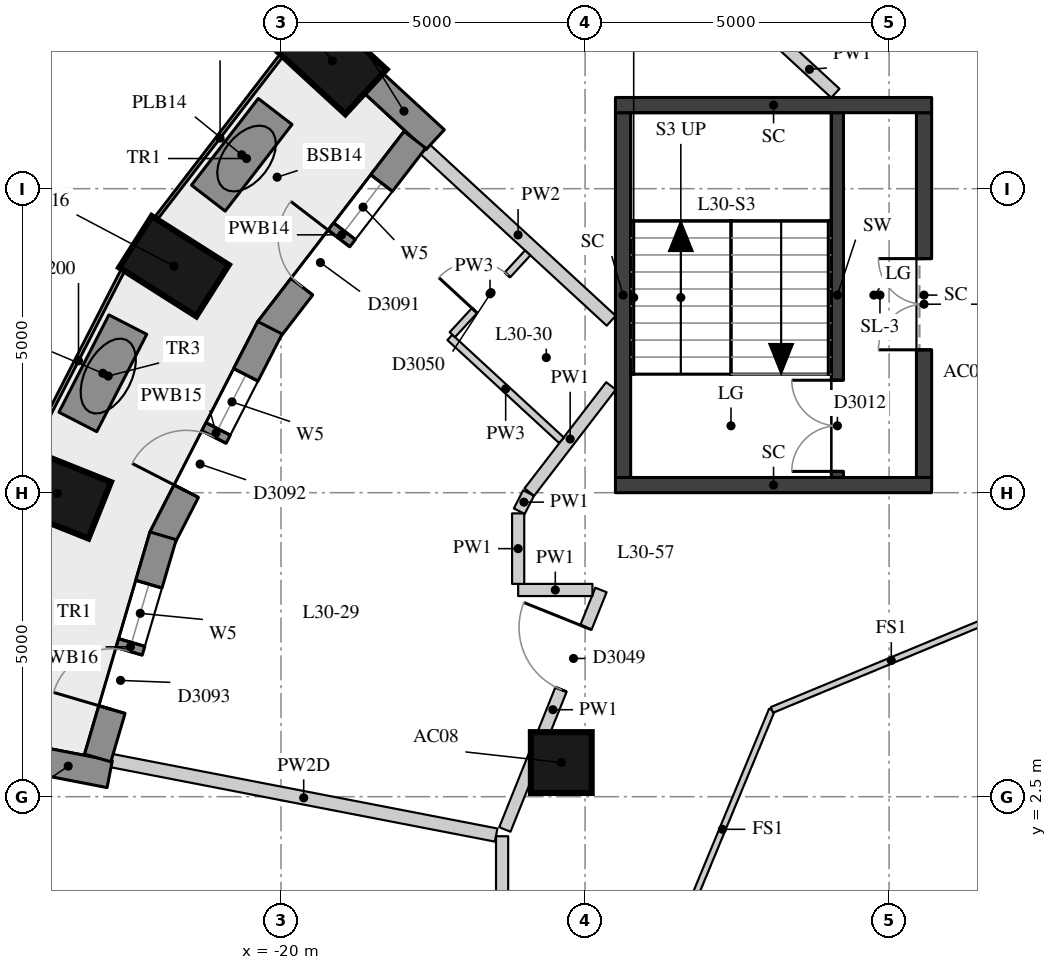
"""IFC4 building model, lengths in metres.
Left out: names, types, materials, properties, quantities, classifications, styles, units other than length and angle.
Written with IfcOpenShell. Run it as: python <this file> out.ifc"""

import sys

from ifc_helpers import new_model, si_unit, direction, frame, frame_2d, origin, origin_2d, place, context, subcontext, project, spatial, rectangle, extrude, element, fill, save


model = new_model("IFC4")
c1 = context("Model", 3, precision=1e-05, world=origin(), true_north=direction((0.0, 1.0)))
c2 = subcontext(c1, "Body", "Model", "MODEL_VIEW")
j1 = project(units=[si_unit("LENGTHUNIT", "METRE"), si_unit("PLANEANGLEUNIT", "RADIAN")], contexts=[c1])
p1 = place(None, origin())
s1 = spatial("IfcSite", under=j1, at=p1, CompositionType="ELEMENT")
p2 = place(p1, origin())
s2 = spatial("IfcBuilding", under=s1, at=p2, CompositionType="ELEMENT")
p3 = place(p2, frame((0.0, 0.0, 108.7)))
s3 = spatial("IfcBuildingStorey", under=s2, at=p3, CompositionType="ELEMENT", Elevation=108.7)
for number, where, z_axis, x_axis in (
    (1, (-19.156, 14.602, 0.0), (0.0, 0.0, 1.0), (-0.735, 0.678, 0.0)),
    (2, (-21.76, 11.225, 0.0), (0.0, 0.0, 1.0), (-0.845, 0.536, 0.0)),
    (3, (-23.679, 7.489, 0.0), (0.0, 0.0, 1.0), (-0.929, 0.371, 0.0)),
):
    element("IfcColumn", number, at=place(p3, frame(where, z_axis=z_axis, x_axis=x_axis)), inside=s3, PredefinedType="COLUMN", context=c2, shape_type="SweptSolid", body=[
        extrude(rectangle(XDim=1.5, YDim=1.0, at=origin_2d()), origin(), (0.0, 0.0, 1.0), 3.3),
    ])
p4 = place(p3, frame((-15.391, 3.062, 0.0), z_axis=(0.0, 0.0, 1.0), x_axis=(1.0, 0.0, 0.0)))
e4 = element("IfcColumn", 4, at=p4, inside=s3, PredefinedType="COLUMN", context=c2, shape_type="SweptSolid", body=[
    extrude(rectangle(XDim=1.0, YDim=1.0, at=origin_2d()), origin(), (0.0, 0.0, 1.0), 3.3),
])
p5 = place(p3, frame((-18.49, 14.247, 0.0), z_axis=(0.0, 0.0, 1.0), x_axis=(0.735307968822, -0.67773312667, 0.0)))
e5 = element("IfcWall", 5, at=p5, inside=s3, PredefinedType="SOLIDWALL", context=c2, shape_type="SweptSolid", body=[
    extrude(rectangle(XDim=1.391, YDim=0.45, at=frame_2d((0.695, 0.0))), origin(), (0.0, 0.0, 1.0), 3.02),
])
p6 = place(p3, frame((-24.183, 3.135, 0.0), z_axis=(0.0, 0.0, 1.0), x_axis=(0.981744955624, -0.190202108576, 0.0)))
e6 = element("IfcWall", 6, at=p6, inside=s3, PredefinedType="SOLIDWALL", context=c2, shape_type="SweptSolid", body=[
    extrude(rectangle(XDim=1.39, YDim=0.45, at=frame_2d((0.695, 0.0))), origin(), (0.0, 0.0, 1.0), 2.47),
])
p7 = place(p3, frame((-17.799, 13.304, 0.0), z_axis=(0.0, 0.0, 1.0), x_axis=(-0.609698797728, -0.792633191362, 0.0)))
e7 = element("IfcWall", 7, at=p7, inside=s3, PredefinedType="SOLIDWALL", context=c2, shape_type="SweptSolid", body=[
    extrude(rectangle(XDim=3.945, YDim=0.45, at=frame_2d((1.973, 0.0))), origin(), (0.0, 0.0, 1.0), 3.02),
])
p8 = place(p7, frame((0.897, 0.0, 0.4)))
e8 = element("IfcOpeningElement", 8, at=p8, cuts=e7, PredefinedType="OPENING", context=c2, shape_type="SweptSolid", body=[
    extrude(rectangle(XDim=1.0, YDim=1.75, at=frame_2d((0.5, 0.875))), frame((0.0, 0.235, 0.0), z_axis=(0.0, -1.0, 0.0), x_axis=(1.0, 0.0, 0.0)), (0.0, 0.0, 1.0), 0.47),
])
p9 = place(p7, frame((2.047, 0.0, 0.0)))
e9 = element("IfcOpeningElement", 9, at=p9, cuts=e7, PredefinedType="OPENING", context=c2, shape_type="SweptSolid", body=[
    extrude(rectangle(XDim=1.0, YDim=2.15, at=frame_2d((0.5, 1.075))), frame((0.0, 0.235, 0.0), z_axis=(0.0, -1.0, 0.0), x_axis=(1.0, 0.0, 0.0)), (0.0, 0.0, 1.0), 0.47),
])
p10 = place(p3, frame((-20.182, 10.212, 0.0), z_axis=(0.0, 0.0, 1.0), x_axis=(-0.455932890657, -0.890014156751, 0.0)))
e10 = element("IfcWall", 10, at=p10, inside=s3, PredefinedType="SOLIDWALL", context=c2, shape_type="SweptSolid", body=[
    extrude(rectangle(XDim=3.888, YDim=0.45, at=frame_2d((1.944, 0.0))), origin(), (0.0, 0.0, 1.0), 3.02),
])
p11 = place(p10, frame((0.869, 0.0, 0.4)))
e11 = element("IfcOpeningElement", 11, at=p11, cuts=e10, PredefinedType="OPENING", context=c2, shape_type="SweptSolid", body=[
    extrude(rectangle(XDim=1.0, YDim=1.75, at=frame_2d((0.5, 0.875))), frame((0.0, 0.235, 0.0), z_axis=(0.0, -1.0, 0.0), x_axis=(1.0, 0.0, 0.0)), (0.0, 0.0, 1.0), 0.47),
])
p12 = place(p10, frame((2.019, 0.0, 0.0)))
e12 = element("IfcOpeningElement", 12, at=p12, cuts=e10, PredefinedType="OPENING", context=c2, shape_type="SweptSolid", body=[
    extrude(rectangle(XDim=1.0, YDim=2.15, at=frame_2d((0.5, 1.075))), frame((0.0, 0.235, 0.0), z_axis=(0.0, -1.0, 0.0), x_axis=(1.0, 0.0, 0.0)), (0.0, 0.0, 1.0), 0.47),
])
p13 = place(p3, frame((-21.939, 6.791, 0.0), z_axis=(0.0, 0.0, 1.0), x_axis=(-0.282350284167, -0.959311376473, 0.0)))
e13 = element("IfcWall", 13, at=p13, inside=s3, PredefinedType="SOLIDWALL", context=c2, shape_type="SweptSolid", body=[
    extrude(rectangle(XDim=3.808, YDim=0.45, at=frame_2d((1.904, 0.0))), origin(), (0.0, 0.0, 1.0), 3.02),
])
p14 = place(p13, frame((0.829, 0.0, 0.4)))
e14 = element("IfcOpeningElement", 14, at=p14, cuts=e13, PredefinedType="OPENING", context=c2, shape_type="SweptSolid", body=[
    extrude(rectangle(XDim=1.0, YDim=1.75, at=frame_2d((0.5, 0.875))), frame((0.0, 0.235, 0.0), z_axis=(0.0, -1.0, 0.0), x_axis=(1.0, 0.0, 0.0)), (0.0, 0.0, 1.0), 0.47),
])
p15 = place(p13, frame((1.979, 0.0, 0.0)))
e15 = element("IfcOpeningElement", 15, at=p15, cuts=e13, PredefinedType="OPENING", context=c2, shape_type="SweptSolid", body=[
    extrude(rectangle(XDim=1.0, YDim=2.15, at=frame_2d((0.5, 1.075))), frame((0.0, 0.235, 0.0), z_axis=(0.0, -1.0, 0.0), x_axis=(1.0, 0.0, 0.0)), (0.0, 0.0, 1.0), 0.47),
])
p16 = place(p3, frame((-20.096, 13.77, 0.0), z_axis=(0.0, 0.0, 1.0), x_axis=(-0.610752434717, -0.791821610899, 0.0)))
e16 = element("IfcWall", 16, at=p16, inside=s3, PredefinedType="USERDEFINED", context=c2, shape_type="SweptSolid", body=[
    extrude(rectangle(XDim=1.8, YDim=0.7, at=frame_2d((0.9, 0.0))), origin(), (0.0, 0.0, 1.0), 0.75),
])
p17 = place(p3, frame((-22.52, 10.265, 0.0), z_axis=(0.0, 0.0, 1.0), x_axis=(-0.456845298981, -0.88954616114, 0.0)))
e17 = element("IfcWall", 17, at=p17, inside=s3, PredefinedType="USERDEFINED", context=c2, shape_type="SweptSolid", body=[
    extrude(rectangle(XDim=1.8, YDim=0.7, at=frame_2d((0.9, 0.0))), origin(), (0.0, 0.0, 1.0), 0.75),
])
p18 = place(p3, frame((-10.85, 7.75, 0.0), z_axis=(0.0, 0.0, 1.0), x_axis=(0.0, 1.0, 0.0)))
e18 = element("IfcWall", 18, at=p18, inside=s3, PredefinedType="SHEAR", context=c2, shape_type="SweptSolid", body=[
    extrude(rectangle(XDim=6.0, YDim=0.2, at=frame_2d((3.0, 0.0))), origin(), (0.0, 0.0, 1.0), 3.02),
])
p19 = place(p18, frame((0.1, 0.0, 0.0)))
e19 = element("IfcOpeningElement", 19, at=p19, cuts=e18, PredefinedType="OPENING", context=c2, shape_type="SweptSolid", body=[
    extrude(rectangle(XDim=1.5, YDim=2.1, at=frame_2d((0.75, 1.05))), frame((0.0, 0.11, 0.0), z_axis=(0.0, -1.0, 0.0), x_axis=(1.0, 0.0, 0.0)), (0.0, 0.0, 1.0), 0.22),
])
p20 = place(p3, frame((-14.375, 7.75, -0.28), z_axis=(0.0, 0.0, 1.0), x_axis=(0.0, 1.0, 0.0)))
e20 = element("IfcWall", 20, at=p20, inside=s3, PredefinedType="SHEAR", context=c2, shape_type="SweptSolid", body=[
    extrude(rectangle(XDim=6.0, YDim=0.25, at=frame_2d((3.0, 0.0))), origin(), (0.0, 0.0, 1.0), 3.3),
])
p21 = place(p3, frame((-9.425, 7.75, -0.28), z_axis=(0.0, 0.0, 1.0), x_axis=(0.0, 1.0, 0.0)))
e21 = element("IfcWall", 21, at=p21, inside=s3, PredefinedType="SHEAR", context=c2, shape_type="SweptSolid", body=[
    extrude(rectangle(XDim=6.0, YDim=0.25, at=frame_2d((3.0, 0.0))), origin(), (0.0, 0.0, 1.0), 3.3),
])
p22 = place(p21, frame((2.1, 0.0, 0.28)))
e22 = element("IfcOpeningElement", 22, at=p22, cuts=e21, PredefinedType="OPENING", context=c2, shape_type="SweptSolid", body=[
    extrude(rectangle(XDim=1.5, YDim=2.1, at=frame_2d((0.75, 1.05))), frame((0.0, 0.135, 0.0), z_axis=(0.0, -1.0, 0.0), x_axis=(1.0, 0.0, 0.0)), (0.0, 0.0, 1.0), 0.27),
])
for number, where, z_axis, x_axis in (
    (23, (-14.5, 13.875, -0.28), (0.0, 0.0, 1.0), (1.0, 0.0, 0.0)),
    (24, (-14.5, 7.625, -0.28), (0.0, 0.0, 1.0), (1.0, 0.0, 0.0)),
):
    element("IfcWall", number, at=place(p3, frame(where, z_axis=z_axis, x_axis=x_axis)), inside=s3, PredefinedType="SHEAR", context=c2, shape_type="SweptSolid", body=[
        extrude(rectangle(XDim=5.2, YDim=0.25, at=frame_2d((2.6, 0.0))), origin(), (0.0, 0.0, 1.0), 3.3),
    ])
p23 = place(p3, frame((-16.364, -2.95, 0.0), z_axis=(0.0, 0.0, 1.0), x_axis=(0.0, 1.0, 0.0)))
e25 = element("IfcWall", 25, at=p23, inside=s3, PredefinedType="PARTITIONING", context=c2, shape_type="SweptSolid", body=[
    extrude(rectangle(XDim=4.799, YDim=0.2, at=frame_2d((2.4, 0.0))), origin(), (0.0, 0.0, 1.0), 2.52),
])
p24 = place(p23, frame((0.835, 0.0, 0.0)))
e26 = element("IfcOpeningElement", 26, at=p24, cuts=e25, PredefinedType="OPENING", context=c2, shape_type="SweptSolid", body=[
    extrude(rectangle(XDim=0.9, YDim=2.1, at=frame_2d((0.45, 1.05))), frame((0.0, 0.11, 0.0), z_axis=(0.0, -1.0, 0.0), x_axis=(1.0, 0.0, 0.0)), (0.0, 0.0, 1.0), 0.22),
])
p25 = place(p3, frame((-16.319, 1.961, 0.0), z_axis=(0.0, 0.0, 1.0), x_axis=(0.372352515432, 0.928091377102, 0.0)))
e27 = element("IfcWall", 27, at=p25, inside=s3, PredefinedType="PARTITIONING", context=c2, shape_type="SweptSolid", body=[
    extrude(rectangle(XDim=4.244, YDim=0.2, at=frame_2d((2.122, 0.0))), origin(), (0.0, 0.0, 1.0), 3.02),
])
p26 = place(p25, frame((2.481, 0.0, 0.0)))
e28 = element("IfcOpeningElement", 28, at=p26, cuts=e27, PredefinedType="OPENING", context=c2, shape_type="SweptSolid", body=[
    extrude(rectangle(XDim=1.1, YDim=2.1, at=frame_2d((0.55, 1.05))), frame((0.0, 0.11, 0.0), z_axis=(0.0, -1.0, 0.0), x_axis=(1.0, 0.0, 0.0)), (0.0, 0.0, 1.0), 0.22),
])
p27 = place(p3, frame((-14.879, 5.9, 0.0), z_axis=(0.0, 0.0, 1.0), x_axis=(-1.0, 0.0, 0.0)))
e29 = element("IfcWall", 29, at=p27, inside=s3, PredefinedType="PARTITIONING", context=c2, shape_type="SweptSolid", body=[
    extrude(rectangle(XDim=1.221, YDim=0.2, at=frame_2d((0.611, 0.0))), origin(), (0.0, 0.0, 1.0), 3.02),
])
p28 = place(p3, frame((-16.1, 6.0, 0.0), z_axis=(0.0, 0.0, 1.0), x_axis=(0.0, 1.0, 0.0)))
e30 = element("IfcWall", 30, at=p28, inside=s3, PredefinedType="PARTITIONING", context=c2, shape_type="SweptSolid", body=[
    extrude(rectangle(XDim=1.16, YDim=0.2, at=frame_2d((0.58, 0.0))), origin(), (0.0, 0.0, 1.0), 3.02),
])
p29 = place(p3, frame((-16.082, 7.196, 0.0), z_axis=(0.0, 0.0, 1.0), x_axis=(0.456789128428, 0.889575006478, 0.0)))
e31 = element("IfcWall", 31, at=p29, inside=s3, PredefinedType="PARTITIONING", context=c2, shape_type="SweptSolid", body=[
    extrude(rectangle(XDim=0.336, YDim=0.2, at=frame_2d((0.168, 0.0))), origin(), (0.0, 0.0, 1.0), 3.02),
])
p30 = place(p3, frame((-15.917, 7.51, 0.0), z_axis=(0.0, 0.0, 1.0), x_axis=(0.609673267649, 0.792652828617, 0.0)))
e32 = element("IfcWall", 32, at=p30, inside=s3, PredefinedType="PARTITIONING", context=c2, shape_type="SweptSolid", body=[
    extrude(rectangle(XDim=2.203, YDim=0.2, at=frame_2d((1.102, 0.0))), origin(), (0.0, 0.0, 1.0), 3.02),
])
p31 = place(p3, frame((-10.883, 14.07, 0.0), z_axis=(0.0, 0.0, 1.0), x_axis=(-0.735263405477, 0.677781472575, 0.0)))
e33 = element("IfcWall", 33, at=p31, inside=s3, PredefinedType="PARTITIONING", context=c2, shape_type="SweptSolid", body=[
    extrude(rectangle(XDim=1.159, YDim=0.2, at=frame_2d((0.58, 0.0))), origin(), (0.0, 0.0, 1.0), 3.02),
])
p32 = place(p3, frame((-17.633, 13.151, 0.0), z_axis=(0.0, 0.0, 1.0), x_axis=(0.73535370522, -0.677683501511, 0.0)))
e34 = element("IfcWall", 34, at=p32, inside=s3, PredefinedType="PARTITIONING", context=c2, shape_type="SweptSolid", body=[
    extrude(rectangle(XDim=4.166, YDim=0.22, at=frame_2d((2.083, 0.0))), origin(), (0.0, 0.0, 1.0), 3.02),
])
p33 = place(p3, frame((-22.793, 3.095, 0.0), z_axis=(0.0, 0.0, 1.0), x_axis=(0.981772102901, -0.190061931918, 0.0)))
e35 = element("IfcWall", 35, at=p33, inside=s3, PredefinedType="PARTITIONING", context=c2, shape_type="SweptSolid", body=[
    extrude(rectangle(XDim=6.448, YDim=0.22, at=frame_2d((3.224, 0.0))), origin(), (0.0, 0.0, 1.0), 2.47),
])
p34 = place(p3, frame((-15.387, 8.362, 0.0), z_axis=(0.0, 0.0, 1.0), x_axis=(-0.735313004993, 0.677727662626, 0.0)))
e36 = element("IfcWall", 36, at=p34, inside=s3, PredefinedType="PARTITIONING", context=c2, shape_type="SweptSolid", body=[
    extrude(rectangle(XDim=2.497, YDim=0.12, at=frame_2d((1.249, 0.0))), origin(), (0.0, 0.0, 1.0), 3.02),
])
p35 = place(p3, frame((-17.183, 10.098, 0.0), z_axis=(0.0, 0.0, 1.0), x_axis=(0.677631502542, 0.735401622763, 0.0)))
e37 = element("IfcWall", 37, at=p35, inside=s3, PredefinedType="PARTITIONING", context=c2, shape_type="SweptSolid", body=[
    extrude(rectangle(XDim=1.83, YDim=0.12, at=frame_2d((0.915, 0.0))), origin(), (0.0, 0.0, 1.0), 3.02),
])
p36 = place(p35, frame((0.54, 0.0, 0.0)))
e38 = element("IfcOpeningElement", 38, at=p36, cuts=e37, PredefinedType="OPENING", context=c2, shape_type="SweptSolid", body=[
    extrude(rectangle(XDim=0.8, YDim=2.1, at=frame_2d((0.4, 1.05))), frame((0.0, 0.07, 0.0), z_axis=(0.0, -1.0, 0.0), x_axis=(1.0, 0.0, 0.0)), (0.0, 0.0, 1.0), 0.14),
])
for number, where, z_axis, x_axis in (
    (39, (-13.554, 0.0, 0.0), (0.0, 0.0, 1.0), (0.383, 0.924, 0.0)),
    (40, (-11.927, 3.927, 0.0), (0.0, 0.0, 1.0), (0.924, 0.383, 0.0)),
):
    element("IfcWall", number, at=place(p3, frame(where, z_axis=z_axis, x_axis=x_axis)), inside=s3, PredefinedType="PARTITIONING", context=c2, shape_type="SweptSolid", body=[
        extrude(rectangle(XDim=4.251, YDim=0.1, at=frame_2d((2.125, 0.0))), origin(), (0.0, 0.0, 1.0), 3.02),
    ])
p37 = place(p8, origin())
e41 = element("IfcWindow", 41, at=p37, inside=s3, PartitioningType="SINGLE_PANEL", PredefinedType="WINDOW", context=c2, shape_type="SweptSolid", body=[
    extrude(rectangle(XDim=1.0, YDim=1.75, at=frame_2d((0.5, 0.875))), frame((0.0, 0.035, 0.0), z_axis=(0.0, -1.0, 0.0), x_axis=(1.0, 0.0, 0.0)), (0.0, 0.0, 1.0), 0.06),
])
fill(e8, e41)
p38 = place(p9, frame((1.0, 0.0, 0.0), z_axis=(0.0, 0.0, 1.0), x_axis=(-1.0, 0.0, 0.0)))
e42 = element("IfcDoor", 42, at=p38, inside=s3, OperationType="SINGLE_SWING_RIGHT", PredefinedType="DOOR", context=c2, shape_type="SweptSolid", body=[
    extrude(rectangle(XDim=1.0, YDim=2.15, at=frame_2d((0.5, 1.075))), frame((0.0, 0.075, 0.0), z_axis=(0.0, -1.0, 0.0), x_axis=(1.0, 0.0, 0.0)), (0.0, 0.0, 1.0), 0.05),
])
fill(e9, e42)
p39 = place(p11, origin())
e43 = element("IfcWindow", 43, at=p39, inside=s3, PartitioningType="SINGLE_PANEL", PredefinedType="WINDOW", context=c2, shape_type="SweptSolid", body=[
    extrude(rectangle(XDim=1.0, YDim=1.75, at=frame_2d((0.5, 0.875))), frame((0.0, 0.035, 0.0), z_axis=(0.0, -1.0, 0.0), x_axis=(1.0, 0.0, 0.0)), (0.0, 0.0, 1.0), 0.06),
])
fill(e11, e43)
p40 = place(p12, frame((1.0, 0.0, 0.0), z_axis=(0.0, 0.0, 1.0), x_axis=(-1.0, 0.0, 0.0)))
e44 = element("IfcDoor", 44, at=p40, inside=s3, OperationType="SINGLE_SWING_LEFT", PredefinedType="DOOR", context=c2, shape_type="SweptSolid", body=[
    extrude(rectangle(XDim=1.0, YDim=2.15, at=frame_2d((0.5, 1.075))), frame((0.0, 0.075, 0.0), z_axis=(0.0, -1.0, 0.0), x_axis=(1.0, 0.0, 0.0)), (0.0, 0.0, 1.0), 0.05),
])
fill(e12, e44)
p41 = place(p14, origin())
e45 = element("IfcWindow", 45, at=p41, inside=s3, PartitioningType="SINGLE_PANEL", PredefinedType="WINDOW", context=c2, shape_type="SweptSolid", body=[
    extrude(rectangle(XDim=1.0, YDim=1.75, at=frame_2d((0.5, 0.875))), frame((0.0, 0.035, 0.0), z_axis=(0.0, -1.0, 0.0), x_axis=(1.0, 0.0, 0.0)), (0.0, 0.0, 1.0), 0.06),
])
fill(e14, e45)
p42 = place(p15, frame((1.0, 0.0, 0.0), z_axis=(0.0, 0.0, 1.0), x_axis=(-1.0, 0.0, 0.0)))
e46 = element("IfcDoor", 46, at=p42, inside=s3, OperationType="SINGLE_SWING_LEFT", PredefinedType="DOOR", context=c2, shape_type="SweptSolid", body=[
    extrude(rectangle(XDim=1.0, YDim=2.15, at=frame_2d((0.5, 1.075))), frame((0.0, 0.075, 0.0), z_axis=(0.0, -1.0, 0.0), x_axis=(1.0, 0.0, 0.0)), (0.0, 0.0, 1.0), 0.05),
])
fill(e15, e46)
p43 = place(p19, origin())
e47 = element("IfcDoor", 47, at=p43, inside=s3, OperationType="DOUBLE_DOOR_SINGLE_SWING", PredefinedType="DOOR", context=c2, shape_type="SweptSolid", body=[
    extrude(rectangle(XDim=1.5, YDim=2.1, at=frame_2d((0.75, 1.05))), frame((0.0, 0.025, 0.0), z_axis=(0.0, -1.0, 0.0), x_axis=(1.0, 0.0, 0.0)), (0.0, 0.0, 1.0), 0.05),
])
fill(e19, e47)
p44 = place(p22, origin())
e48 = element("IfcDoor", 48, at=p44, inside=s3, OperationType="DOUBLE_DOOR_SINGLE_SWING", PredefinedType="DOOR", context=c2, shape_type="SweptSolid", body=[
    extrude(rectangle(XDim=1.5, YDim=2.1, at=frame_2d((0.75, 1.05))), frame((0.0, 0.025, 0.0), z_axis=(0.0, -1.0, 0.0), x_axis=(1.0, 0.0, 0.0)), (0.0, 0.0, 1.0), 0.05),
])
fill(e22, e48)
p45 = place(p26, origin())
e49 = element("IfcDoor", 49, at=p45, inside=s3, OperationType="SINGLE_SWING_RIGHT", PredefinedType="DOOR", context=c2, shape_type="SweptSolid", body=[
    extrude(rectangle(XDim=1.1, YDim=2.1, at=frame_2d((0.55, 1.05))), frame((0.0, 0.025, 0.0), z_axis=(0.0, -1.0, 0.0), x_axis=(1.0, 0.0, 0.0)), (0.0, 0.0, 1.0), 0.05),
])
fill(e28, e49)
p46 = place(p36, origin())
e50 = element("IfcDoor", 50, at=p46, inside=s3, OperationType="SINGLE_SWING_LEFT", PredefinedType="DOOR", context=c2, shape_type="SweptSolid", body=[
    extrude(rectangle(XDim=0.8, YDim=2.1, at=frame_2d((0.4, 1.05))), frame((0.0, 0.025, 0.0), z_axis=(0.0, -1.0, 0.0), x_axis=(1.0, 0.0, 0.0)), (0.0, 0.0, 1.0), 0.05),
])
fill(e38, e50)
save(model, sys.argv[1])
